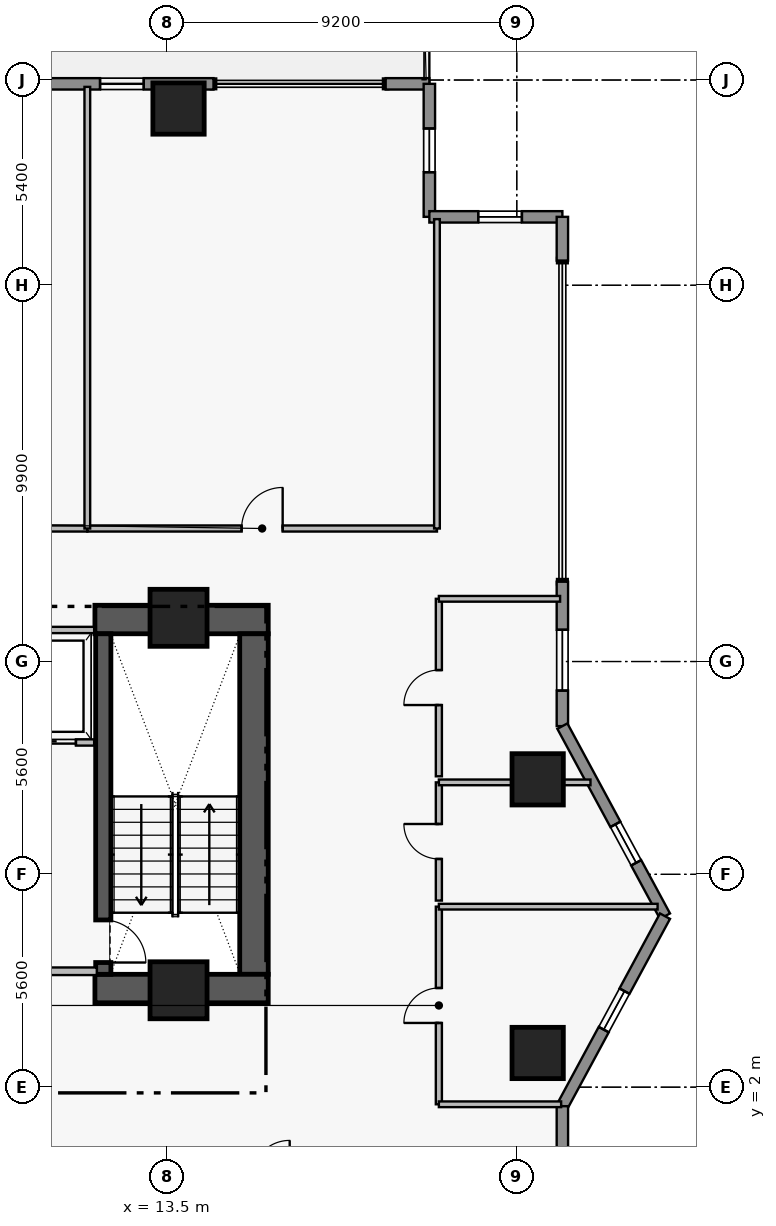
"""IFC4 building model, lengths in metres.
Left out: names, types, materials, properties, quantities, classifications, styles, units other than length and angle.
Written with IfcOpenShell. Run it as: python <this file> out.ifc"""

import sys

from ifc_helpers import new_model, si_unit, direction, frame, frame_2d, origin, origin_2d, place, context, subcontext, project, spatial, rectangle, extrude, element, fill, save


model = new_model("IFC4")
c1 = context("Model", 3, precision=1e-05, world=origin(), true_north=direction((0.0, 1.0)))
c2 = subcontext(c1, "Body", "Model", "MODEL_VIEW")
j1 = project(units=[si_unit("LENGTHUNIT", "METRE"), si_unit("PLANEANGLEUNIT", "RADIAN")], contexts=[c1])
p1 = place(None, origin())
s1 = spatial("IfcSite", under=j1, at=p1, CompositionType="ELEMENT")
p2 = place(p1, origin())
s2 = spatial("IfcBuilding", under=s1, at=p2, CompositionType="ELEMENT")
p3 = place(p2, frame((0.0, 0.0, 121.2)))
s3 = spatial("IfcBuildingStorey", under=s2, at=p3, CompositionType="ELEMENT", Elevation=121.2)
p4 = place(p3, frame((11.6, 14.305, 0.0), z_axis=(0.0, 0.0, 1.0), x_axis=(1.0, 0.0, 0.0)))
e1 = element("IfcWall", 1, at=p4, inside=s3, PredefinedType="SHEAR", context=c2, shape_type="SweptSolid", body=[
    extrude(rectangle(XDim=4.56, YDim=0.75, at=frame_2d((2.28, 0.0))), origin(), (0.0, 0.0, 1.0), 3.46),
])
p5 = place(p3, frame((15.785, 4.97, 0.0), z_axis=(0.0, 0.0, 1.0), x_axis=(0.0, 1.0, 0.0)))
e2 = element("IfcWall", 2, at=p5, inside=s3, PredefinedType="SHEAR", context=c2, shape_type="SweptSolid", body=[
    extrude(rectangle(XDim=8.96, YDim=0.75, at=frame_2d((4.48, 0.0))), origin(), (0.0, 0.0, 1.0), 3.46),
])
p6 = place(p3, frame((11.6, 4.595, 0.0), z_axis=(0.0, 0.0, 1.0), x_axis=(1.0, 0.0, 0.0)))
e3 = element("IfcWall", 3, at=p6, inside=s3, PredefinedType="SHEAR", context=c2, shape_type="SweptSolid", body=[
    extrude(rectangle(XDim=4.56, YDim=0.75, at=frame_2d((2.28, 0.0))), origin(), (0.0, 0.0, 1.0), 3.46),
])
p7 = place(p3, frame((11.82, 13.93, 0.0), z_axis=(0.0, 0.0, 1.0), x_axis=(0.0, -1.0, 0.0)))
e4 = element("IfcWall", 4, at=p7, inside=s3, PredefinedType="SHEAR", context=c2, shape_type="SweptSolid", body=[
    extrude(rectangle(XDim=8.96, YDim=0.4, at=frame_2d((4.48, 0.0))), origin(), (0.0, 0.0, 1.0), 3.46),
])
p8 = place(p7, frame((7.53, 0.0, 0.0)))
e5 = element("IfcOpeningElement", 5, at=p8, cuts=e4, PredefinedType="OPENING", context=c2, shape_type="SweptSolid", body=[
    extrude(rectangle(XDim=1.12, YDim=2.22, at=frame_2d((0.56, 1.11))), frame((0.0, 0.21, 0.0), z_axis=(0.0, -1.0, 0.0), x_axis=(1.0, 0.0, 0.0)), (0.0, 0.0, 1.0), 0.42),
])
for number, where, z_axis, x_axis in (
    (6, (13.8, 14.35, 0.0), (0.0, 0.0, 1.0), (1.0, 0.0, 0.0)),
    (7, (13.8, 4.55, 0.0), (0.0, 0.0, 1.0), (1.0, 0.0, 0.0)),
):
    element("IfcColumn", number, at=place(p3, frame(where, z_axis=z_axis, x_axis=x_axis)), inside=s3, PredefinedType="COLUMN", context=c2, shape_type="SweptSolid", body=[
        extrude(rectangle(XDim=1.5, YDim=1.5, at=origin_2d()), origin(), (0.0, 0.0, 1.0), 3.65),
    ])
for number, where, z_axis, x_axis in (
    (8, (13.8, 27.75, 0.0), (0.0, 0.0, 1.0), (1.0, 0.0, 0.0)),
    (9, (23.25, 2.9, 0.0), (0.0, 0.0, 1.0), (1.0, 0.0, 0.0)),
    (10, (23.25, 10.1, 0.0), (0.0, 0.0, 1.0), (1.0, 0.0, 0.0)),
):
    element("IfcColumn", number, at=place(p3, frame(where, z_axis=z_axis, x_axis=x_axis)), inside=s3, PredefinedType="COLUMN", context=c2, shape_type="SweptSolid", body=[
        extrude(rectangle(XDim=1.35, YDim=1.35, at=origin_2d()), origin(), (0.0, 0.0, 1.0), 3.65),
    ])
p9 = place(p3, frame((7.885, 28.4, 0.0), z_axis=(0.0, 0.0, 1.0), x_axis=(1.0, 0.0, 0.0)))
e11 = element("IfcWall", 11, at=p9, inside=s3, PredefinedType="STANDARD", context=c2, shape_type="SweptSolid", body=[
    extrude(rectangle(XDim=6.835, YDim=0.3, at=frame_2d((3.417, 0.0))), origin(), (0.0, 0.0, 1.0), 3.43),
])
p10 = place(p9, frame((0.65, 0.0, 0.0)))
e12 = element("IfcOpeningElement", 12, at=p10, cuts=e11, PredefinedType="OPENING", context=c2, shape_type="SweptSolid", body=[
    extrude(rectangle(XDim=1.05, YDim=2.2, at=frame_2d((0.525, 1.1))), frame((0.0, 0.16, 0.0), z_axis=(0.0, -1.0, 0.0), x_axis=(1.0, 0.0, 0.0)), (0.0, 0.0, 1.0), 0.32),
])
p11 = place(p9, frame((3.85, 0.0, 0.95)))
e13 = element("IfcOpeningElement", 13, at=p11, cuts=e11, PredefinedType="OPENING", context=c2, shape_type="SweptSolid", body=[
    extrude(rectangle(XDim=1.15, YDim=1.55, at=frame_2d((0.575, 0.775))), frame((0.0, 0.16, 0.0), z_axis=(0.0, -1.0, 0.0), x_axis=(1.0, 0.0, 0.0)), (0.0, 0.0, 1.0), 0.32),
])
p12 = place(p3, frame((19.25, 28.4, 0.0), z_axis=(0.0, 0.0, 1.0), x_axis=(1.0, 0.0, 0.0)))
e14 = element("IfcWall", 14, at=p12, inside=s3, PredefinedType="STANDARD", context=c2, shape_type="SweptSolid", body=[
    extrude(rectangle(XDim=1.15, YDim=0.3, at=frame_2d((0.575, 0.0))), origin(), (0.0, 0.0, 1.0), 3.43),
])
p13 = place(p3, frame((20.4, 28.4, 0.0), z_axis=(0.0, 0.0, 1.0), x_axis=(0.0, -1.0, 0.0)))
e15 = element("IfcWall", 15, at=p13, inside=s3, PredefinedType="STANDARD", context=c2, shape_type="SweptSolid", body=[
    extrude(rectangle(XDim=3.5, YDim=0.3, at=frame_2d((1.75, 0.0))), origin(), (0.0, 0.0, 1.0), 3.43),
])
p14 = place(p13, frame((1.175, 0.0, 1.25)))
e16 = element("IfcOpeningElement", 16, at=p14, cuts=e15, PredefinedType="OPENING", context=c2, shape_type="SweptSolid", body=[
    extrude(rectangle(XDim=1.15, YDim=1.55, at=frame_2d((0.575, 0.775))), frame((0.0, 0.16, 0.0), z_axis=(0.0, -1.0, 0.0), x_axis=(1.0, 0.0, 0.0)), (0.0, 0.0, 1.0), 0.32),
])
p15 = place(p3, frame((20.4, 24.9, 0.0), z_axis=(0.0, 0.0, 1.0), x_axis=(1.0, 0.0, 0.0)))
e17 = element("IfcWall", 17, at=p15, inside=s3, PredefinedType="STANDARD", context=c2, shape_type="SweptSolid", body=[
    extrude(rectangle(XDim=3.5, YDim=0.3, at=frame_2d((1.75, 0.0))), origin(), (0.0, 0.0, 1.0), 3.43),
])
p16 = place(p15, frame((1.285, 0.0, 1.25)))
e18 = element("IfcOpeningElement", 18, at=p16, cuts=e17, PredefinedType="OPENING", context=c2, shape_type="SweptSolid", body=[
    extrude(rectangle(XDim=1.15, YDim=1.55, at=frame_2d((0.575, 0.775))), frame((0.0, 0.16, 0.0), z_axis=(0.0, -1.0, 0.0), x_axis=(1.0, 0.0, 0.0)), (0.0, 0.0, 1.0), 0.32),
])
p17 = place(p3, frame((23.9, 24.9, 0.0), z_axis=(0.0, 0.0, 1.0), x_axis=(0.0, -1.0, 0.0)))
e19 = element("IfcWall", 19, at=p17, inside=s3, PredefinedType="STANDARD", context=c2, shape_type="SweptSolid", body=[
    extrude(rectangle(XDim=1.15, YDim=0.3, at=frame_2d((0.575, 0.0))), origin(), (0.0, 0.0, 1.0), 3.43),
])
p18 = place(p3, frame((23.9, 15.3, 0.0), z_axis=(0.0, 0.0, 1.0), x_axis=(0.0, -1.0, 0.0)))
e20 = element("IfcWall", 20, at=p18, inside=s3, PredefinedType="STANDARD", context=c2, shape_type="SweptSolid", body=[
    extrude(rectangle(XDim=3.8, YDim=0.3, at=frame_2d((1.9, 0.0))), origin(), (0.0, 0.0, 1.0), 3.43),
])
p19 = place(p18, frame((1.265, 0.0, 0.85)))
e21 = element("IfcOpeningElement", 21, at=p19, cuts=e20, PredefinedType="OPENING", context=c2, shape_type="SweptSolid", body=[
    extrude(rectangle(XDim=1.6, YDim=1.8, at=frame_2d((0.8, 0.9))), frame((0.0, 0.16, 0.0), z_axis=(0.0, -1.0, 0.0), x_axis=(1.0, 0.0, 0.0)), (0.0, 0.0, 1.0), 0.32),
])
p20 = place(p3, frame((23.9, 11.5, 0.0), z_axis=(0.0, 0.0, 1.0), x_axis=(0.475175525499, -0.879891027325, 0.0)))
e22 = element("IfcWall", 22, at=p20, inside=s3, PredefinedType="STANDARD", context=c2, shape_type="SweptSolid", body=[
    extrude(rectangle(XDim=5.683, YDim=0.3, at=frame_2d((2.841, 0.0))), origin(), (0.0, 0.0, 1.0), 3.43),
])
p21 = place(p20, frame((2.937, 0.0, 1.25)))
e23 = element("IfcOpeningElement", 23, at=p21, cuts=e22, PredefinedType="OPENING", context=c2, shape_type="SweptSolid", body=[
    extrude(rectangle(XDim=1.15, YDim=1.55, at=frame_2d((0.575, 0.775))), frame((0.0, 0.16, 0.0), z_axis=(0.0, -1.0, 0.0), x_axis=(1.0, 0.0, 0.0)), (0.0, 0.0, 1.0), 0.32),
])
p22 = place(p3, frame((26.6, 6.5, 0.0), z_axis=(0.0, 0.0, 1.0), x_axis=(-0.475175525499, -0.879891027325, 0.0)))
e24 = element("IfcWall", 24, at=p22, inside=s3, PredefinedType="STANDARD", context=c2, shape_type="SweptSolid", body=[
    extrude(rectangle(XDim=5.683, YDim=0.3, at=frame_2d((2.841, 0.0))), origin(), (0.0, 0.0, 1.0), 3.43),
])
p23 = place(p22, frame((2.242, 0.0, 1.25)))
e25 = element("IfcOpeningElement", 25, at=p23, cuts=e24, PredefinedType="OPENING", context=c2, shape_type="SweptSolid", body=[
    extrude(rectangle(XDim=1.15, YDim=1.55, at=frame_2d((0.575, 0.775))), frame((0.0, 0.16, 0.0), z_axis=(0.0, -1.0, 0.0), x_axis=(1.0, 0.0, 0.0)), (0.0, 0.0, 1.0), 0.32),
])
p24 = place(p3, frame((23.9, 1.5, 0.0), z_axis=(0.0, 0.0, 1.0), x_axis=(0.0, -1.0, 0.0)))
e26 = element("IfcWall", 26, at=p24, inside=s3, PredefinedType="STANDARD", context=c2, shape_type="SweptSolid", body=[
    extrude(rectangle(XDim=1.15, YDim=0.3, at=frame_2d((0.575, 0.0))), origin(), (0.0, 0.0, 1.0), 3.43),
])
p25 = place(p3, frame((9.42, 11.07, 0.0), z_axis=(0.0, 0.0, 1.0), x_axis=(1.0, 0.0, 0.0)))
e27 = element("IfcWall", 27, at=p25, inside=s3, PredefinedType="PARTITIONING", context=c2, shape_type="SweptSolid", body=[
    extrude(rectangle(XDim=2.16, YDim=0.165, at=frame_2d((1.08, 0.0))), origin(), (0.0, 0.0, 1.0), 3.43),
])
p26 = place(p25, frame((0.53, 0.0, 0.0)))
e28 = element("IfcOpeningElement", 28, at=p26, cuts=e27, PredefinedType="OPENING", context=c2, shape_type="SweptSolid", body=[
    extrude(rectangle(XDim=1.15, YDim=2.25, at=frame_2d((0.575, 1.125))), frame((0.0, 0.093, 0.0), z_axis=(0.0, -1.0, 0.0), x_axis=(1.0, 0.0, 0.0)), (0.0, 0.0, 1.0), 0.185),
])
p27 = place(p3, frame((3.6, 16.7, 0.0), z_axis=(0.0, 0.0, 1.0), x_axis=(1.0, 0.0, 0.0)))
e29 = element("IfcWall", 29, at=p27, inside=s3, PredefinedType="PARTITIONING", context=c2, shape_type="SweptSolid", body=[
    extrude(rectangle(XDim=7.8, YDim=0.16, at=frame_2d((3.9, 0.0))), origin(), (0.0, 0.0, 1.0), 2.973),
])
p28 = place(p27, frame((4.55, 0.0, 0.0)))
e30 = element("IfcOpeningElement", 30, at=p28, cuts=e29, PredefinedType="OPENING", context=c2, shape_type="SweptSolid", body=[
    extrude(rectangle(XDim=1.0, YDim=2.15, at=frame_2d((0.5, 1.075))), frame((0.0, 0.09, 0.0), z_axis=(0.0, -1.0, 0.0), x_axis=(1.0, 0.0, 0.0)), (0.0, 0.0, 1.0), 0.18),
])
p29 = place(p3, frame((11.4, 16.7, 0.0), z_axis=(0.0, 0.0, 1.0), x_axis=(1.0, 0.0, 0.0)))
e31 = element("IfcWall", 31, at=p29, inside=s3, PredefinedType="PARTITIONING", context=c2, shape_type="SweptSolid", body=[
    extrude(rectangle(XDim=9.2, YDim=0.16, at=frame_2d((4.6, 0.0))), origin(), (0.0, 0.0, 1.0), 2.973),
])
p30 = place(p29, frame((4.06, 0.0, 0.0)))
e32 = element("IfcOpeningElement", 32, at=p30, cuts=e31, PredefinedType="OPENING", context=c2, shape_type="SweptSolid", body=[
    extrude(rectangle(XDim=1.08, YDim=2.18, at=frame_2d((0.54, 1.09))), frame((0.0, 0.09, 0.0), z_axis=(0.0, -1.0, 0.0), x_axis=(1.0, 0.0, 0.0)), (0.0, 0.0, 1.0), 0.18),
])
p31 = place(p3, frame((20.65, 1.55, 0.0), z_axis=(0.0, 0.0, 1.0), x_axis=(0.0, 1.0, 0.0)))
e33 = element("IfcWall", 33, at=p31, inside=s3, PredefinedType="PARTITIONING", context=c2, shape_type="SweptSolid", body=[
    extrude(rectangle(XDim=5.2, YDim=0.16, at=frame_2d((2.6, 0.0))), origin(), (0.0, 0.0, 1.0), 3.43),
])
p32 = place(p31, frame((2.14, 0.0, 0.0)))
e34 = element("IfcOpeningElement", 34, at=p32, cuts=e33, PredefinedType="OPENING", context=c2, shape_type="SweptSolid", body=[
    extrude(rectangle(XDim=0.92, YDim=2.12, at=frame_2d((0.46, 1.06))), frame((0.0, 0.09, 0.0), z_axis=(0.0, -1.0, 0.0), x_axis=(1.0, 0.0, 0.0)), (0.0, 0.0, 1.0), 0.18),
])
p33 = place(p3, frame((20.65, 6.91, 0.0), z_axis=(0.0, 0.0, 1.0), x_axis=(0.0, 1.0, 0.0)))
e35 = element("IfcWall", 35, at=p33, inside=s3, PredefinedType="PARTITIONING", context=c2, shape_type="SweptSolid", body=[
    extrude(rectangle(XDim=3.11, YDim=0.16, at=frame_2d((1.555, 0.0))), origin(), (0.0, 0.0, 1.0), 3.43),
])
p34 = place(p33, frame((1.095, 0.0, 0.0)))
e36 = element("IfcOpeningElement", 36, at=p34, cuts=e35, PredefinedType="OPENING", context=c2, shape_type="SweptSolid", body=[
    extrude(rectangle(XDim=0.92, YDim=2.12, at=frame_2d((0.46, 1.06))), frame((0.0, 0.09, 0.0), z_axis=(0.0, -1.0, 0.0), x_axis=(1.0, 0.0, 0.0)), (0.0, 0.0, 1.0), 0.18),
])
p35 = place(p3, frame((20.65, 10.18, 0.0), z_axis=(0.0, 0.0, 1.0), x_axis=(0.0, 1.0, 0.0)))
e37 = element("IfcWall", 37, at=p35, inside=s3, PredefinedType="PARTITIONING", context=c2, shape_type="SweptSolid", body=[
    extrude(rectangle(XDim=4.67, YDim=0.16, at=frame_2d((2.335, 0.0))), origin(), (0.0, 0.0, 1.0), 3.43),
])
p36 = place(p35, frame((1.875, 0.0, 0.0)))
e38 = element("IfcOpeningElement", 38, at=p36, cuts=e37, PredefinedType="OPENING", context=c2, shape_type="SweptSolid", body=[
    extrude(rectangle(XDim=0.92, YDim=2.12, at=frame_2d((0.46, 1.06))), frame((0.0, 0.09, 0.0), z_axis=(0.0, -1.0, 0.0), x_axis=(1.0, 0.0, 0.0)), (0.0, 0.0, 1.0), 0.18),
])
p37 = place(p3, frame((8.8, 5.05, 0.0), z_axis=(0.0, 0.0, 1.0), x_axis=(1.0, 0.0, 0.0)))
e39 = element("IfcWall", 39, at=p37, inside=s3, PredefinedType="PARTITIONING", context=c2, shape_type="SweptSolid", body=[
    extrude(rectangle(XDim=2.85, YDim=0.2, at=frame_2d((1.425, 0.0))), origin(), (0.0, 0.0, 1.0), 3.43),
])
p38 = place(p3, frame((9.42, 14.03, 0.0), z_axis=(0.0, 0.0, 1.0), x_axis=(1.0, 0.0, 0.0)))
e40 = element("IfcWall", 40, at=p38, inside=s3, PredefinedType="PARTITIONING", context=c2, shape_type="SweptSolid", body=[
    extrude(rectangle(XDim=2.16, YDim=0.165, at=frame_2d((1.08, 0.0))), origin(), (0.0, 0.0, 1.0), 3.43),
])
p39 = place(p3, frame((11.4, 16.7, 0.0), z_axis=(0.0, 0.0, 1.0), x_axis=(0.0, 1.0, 0.0)))
e41 = element("IfcWall", 41, at=p39, inside=s3, PredefinedType="PARTITIONING", context=c2, shape_type="SweptSolid", body=[
    extrude(rectangle(XDim=11.62, YDim=0.15, at=frame_2d((5.81, 0.0))), origin(), (0.0, 0.0, 1.0), 3.43),
])
p40 = place(p3, frame((20.6, 16.7, 0.0), z_axis=(0.0, 0.0, 1.0), x_axis=(0.0, 1.0, 0.0)))
e42 = element("IfcWall", 42, at=p40, inside=s3, PredefinedType="PARTITIONING", context=c2, shape_type="SweptSolid", body=[
    extrude(rectangle(XDim=8.14, YDim=0.15, at=frame_2d((4.07, 0.0))), origin(), (0.0, 0.0, 1.0), 3.43),
])
p41 = place(p3, frame((20.65, 1.55, 0.0), z_axis=(0.0, 0.0, 1.0), x_axis=(1.0, 0.0, 0.0)))
e43 = element("IfcWall", 43, at=p41, inside=s3, PredefinedType="PARTITIONING", context=c2, shape_type="SweptSolid", body=[
    extrude(rectangle(XDim=3.217, YDim=0.15, at=frame_2d((1.608, 0.0))), origin(), (0.0, 0.0, 1.0), 3.43),
])
p42 = place(p3, frame((20.65, 6.75, 0.0), z_axis=(0.0, 0.0, 1.0), x_axis=(1.0, 0.0, 0.0)))
e44 = element("IfcWall", 44, at=p42, inside=s3, PredefinedType="PARTITIONING", context=c2, shape_type="SweptSolid", body=[
    extrude(rectangle(XDim=5.755, YDim=0.15, at=frame_2d((2.877, 0.0))), origin(), (0.0, 0.0, 1.0), 3.43),
])
p43 = place(p3, frame((20.65, 10.02, 0.0), z_axis=(0.0, 0.0, 1.0), x_axis=(1.0, 0.0, 0.0)))
e45 = element("IfcWall", 45, at=p43, inside=s3, PredefinedType="PARTITIONING", context=c2, shape_type="SweptSolid", body=[
    extrude(rectangle(XDim=3.989, YDim=0.15, at=frame_2d((1.995, 0.0))), origin(), (0.0, 0.0, 1.0), 3.43),
])
p44 = place(p3, frame((20.65, 14.85, 0.0), z_axis=(0.0, 0.0, 1.0), x_axis=(1.0, 0.0, 0.0)))
e46 = element("IfcWall", 46, at=p44, inside=s3, PredefinedType="PARTITIONING", context=c2, shape_type="SweptSolid", body=[
    extrude(rectangle(XDim=3.19, YDim=0.15, at=frame_2d((1.595, 0.0))), origin(), (0.0, 0.0, 1.0), 3.43),
])
p45 = place(p11, origin())
e47 = element("IfcWindow", 47, at=p45, inside=s3, PartitioningType="SINGLE_PANEL", PredefinedType="WINDOW", context=c2, shape_type="SweptSolid", body=[
    extrude(rectangle(XDim=1.15, YDim=1.55, at=frame_2d((0.575, 0.775))), frame((0.0, 0.03, 0.0), z_axis=(0.0, -1.0, 0.0), x_axis=(1.0, 0.0, 0.0)), (0.0, 0.0, 1.0), 0.06),
])
fill(e13, e47)
p46 = place(p14, origin())
e48 = element("IfcWindow", 48, at=p46, inside=s3, PartitioningType="SINGLE_PANEL", PredefinedType="WINDOW", context=c2, shape_type="SweptSolid", body=[
    extrude(rectangle(XDim=1.15, YDim=1.55, at=frame_2d((0.575, 0.775))), frame((0.0, 0.03, 0.0), z_axis=(0.0, -1.0, 0.0), x_axis=(1.0, 0.0, 0.0)), (0.0, 0.0, 1.0), 0.06),
])
fill(e16, e48)
p47 = place(p16, origin())
e49 = element("IfcWindow", 49, at=p47, inside=s3, PartitioningType="SINGLE_PANEL", PredefinedType="WINDOW", context=c2, shape_type="SweptSolid", body=[
    extrude(rectangle(XDim=1.15, YDim=1.55, at=frame_2d((0.575, 0.775))), frame((0.0, 0.03, 0.0), z_axis=(0.0, -1.0, 0.0), x_axis=(1.0, 0.0, 0.0)), (0.0, 0.0, 1.0), 0.06),
])
fill(e18, e49)
p48 = place(p19, origin())
e50 = element("IfcWindow", 50, at=p48, inside=s3, PartitioningType="SINGLE_PANEL", PredefinedType="WINDOW", context=c2, shape_type="SweptSolid", body=[
    extrude(rectangle(XDim=1.6, YDim=1.8, at=frame_2d((0.8, 0.9))), frame((0.0, 0.03, 0.0), z_axis=(0.0, -1.0, 0.0), x_axis=(1.0, 0.0, 0.0)), (0.0, 0.0, 1.0), 0.06),
])
fill(e21, e50)
p49 = place(p21, origin())
e51 = element("IfcWindow", 51, at=p49, inside=s3, PartitioningType="SINGLE_PANEL", PredefinedType="WINDOW", context=c2, shape_type="SweptSolid", body=[
    extrude(rectangle(XDim=1.15, YDim=1.55, at=frame_2d((0.575, 0.775))), frame((0.0, 0.03, 0.0), z_axis=(0.0, -1.0, 0.0), x_axis=(1.0, 0.0, 0.0)), (0.0, 0.0, 1.0), 0.06),
])
fill(e23, e51)
p50 = place(p23, origin())
e52 = element("IfcWindow", 52, at=p50, inside=s3, PartitioningType="SINGLE_PANEL", PredefinedType="WINDOW", context=c2, shape_type="SweptSolid", body=[
    extrude(rectangle(XDim=1.15, YDim=1.55, at=frame_2d((0.575, 0.775))), frame((0.0, 0.03, 0.0), z_axis=(0.0, -1.0, 0.0), x_axis=(1.0, 0.0, 0.0)), (0.0, 0.0, 1.0), 0.06),
])
fill(e25, e52)
p51 = place(p8, origin())
e53 = element("IfcDoor", 53, at=p51, inside=s3, OperationType="SINGLE_SWING_RIGHT", PredefinedType="DOOR", context=c2, shape_type="SweptSolid", body=[
    extrude(rectangle(XDim=1.12, YDim=2.22, at=frame_2d((0.56, 1.11))), frame((0.0, 0.025, 0.0), z_axis=(0.0, -1.0, 0.0), x_axis=(1.0, 0.0, 0.0)), (0.0, 0.0, 1.0), 0.05),
])
fill(e5, e53)
p52 = place(p26, origin())
e54 = element("IfcDoor", 54, at=p52, inside=s3, OperationType="SLIDING_TO_LEFT", PredefinedType="DOOR", context=c2, shape_type="SweptSolid", body=[
    extrude(rectangle(XDim=1.15, YDim=2.25, at=frame_2d((0.575, 1.125))), frame((0.0, 0.025, 0.0), z_axis=(0.0, -1.0, 0.0), x_axis=(1.0, 0.0, 0.0)), (0.0, 0.0, 1.0), 0.05),
])
fill(e28, e54)
p53 = place(p30, origin())
e55 = element("IfcDoor", 55, at=p53, inside=s3, OperationType="SINGLE_SWING_RIGHT", PredefinedType="DOOR", context=c2, shape_type="SweptSolid", body=[
    extrude(rectangle(XDim=1.08, YDim=2.18, at=frame_2d((0.54, 1.09))), frame((0.0, 0.025, 0.0), z_axis=(0.0, -1.0, 0.0), x_axis=(1.0, 0.0, 0.0)), (0.0, 0.0, 1.0), 0.05),
])
fill(e32, e55)
p54 = place(p32, origin())
e56 = element("IfcDoor", 56, at=p54, inside=s3, OperationType="SINGLE_SWING_LEFT", PredefinedType="DOOR", context=c2, shape_type="SweptSolid", body=[
    extrude(rectangle(XDim=0.92, YDim=2.12, at=frame_2d((0.46, 1.06))), frame((0.0, 0.025, 0.0), z_axis=(0.0, -1.0, 0.0), x_axis=(1.0, 0.0, 0.0)), (0.0, 0.0, 1.0), 0.05),
])
fill(e34, e56)
p55 = place(p34, origin())
e57 = element("IfcDoor", 57, at=p55, inside=s3, OperationType="SINGLE_SWING_RIGHT", PredefinedType="DOOR", context=c2, shape_type="SweptSolid", body=[
    extrude(rectangle(XDim=0.92, YDim=2.12, at=frame_2d((0.46, 1.06))), frame((0.0, 0.025, 0.0), z_axis=(0.0, -1.0, 0.0), x_axis=(1.0, 0.0, 0.0)), (0.0, 0.0, 1.0), 0.05),
])
fill(e36, e57)
p56 = place(p36, origin())
e58 = element("IfcDoor", 58, at=p56, inside=s3, OperationType="SINGLE_SWING_LEFT", PredefinedType="DOOR", context=c2, shape_type="SweptSolid", body=[
    extrude(rectangle(XDim=0.92, YDim=2.12, at=frame_2d((0.46, 1.06))), frame((0.0, 0.025, 0.0), z_axis=(0.0, -1.0, 0.0), x_axis=(1.0, 0.0, 0.0)), (0.0, 0.0, 1.0), 0.05),
])
fill(e38, e58)
save(model, sys.argv[1])
